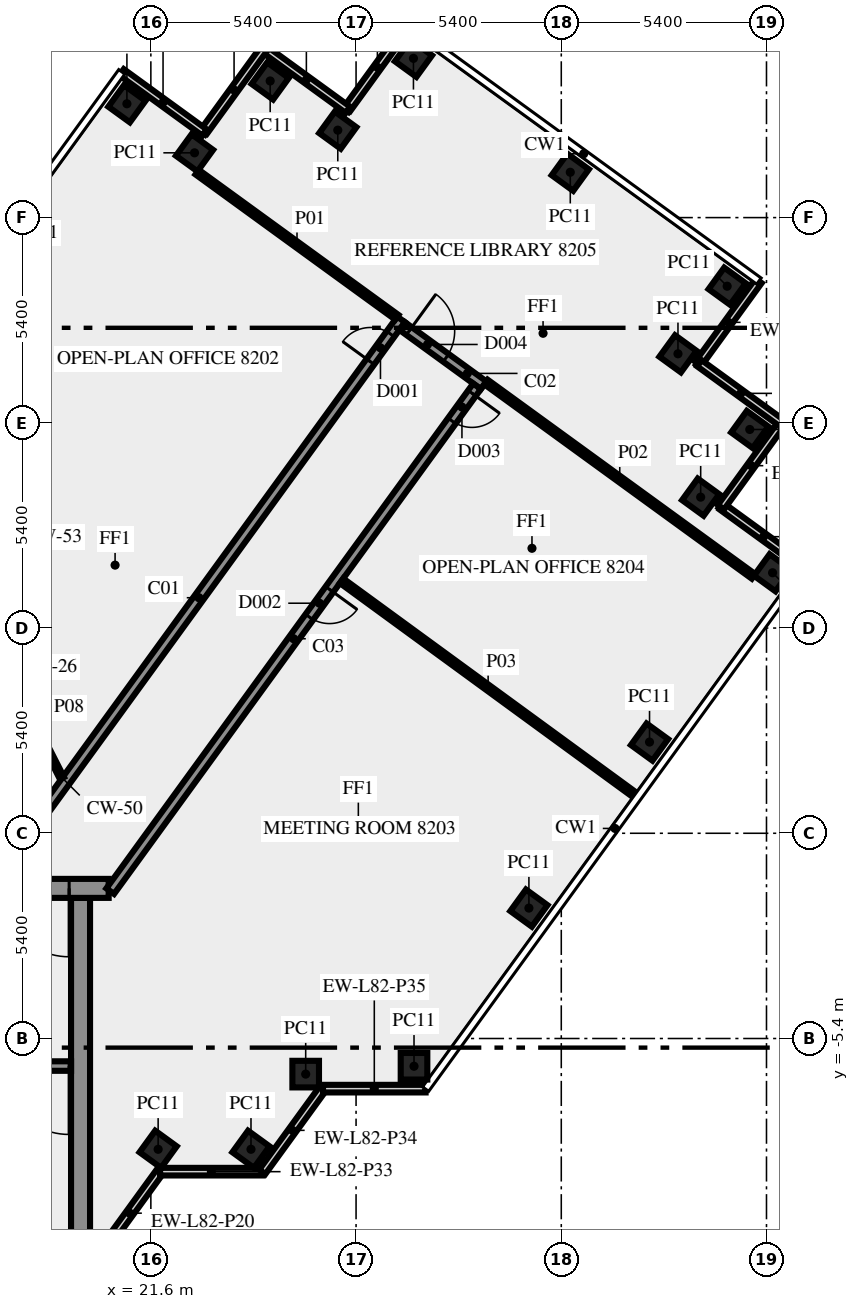
"""IFC4 building model, lengths in metres.
Left out: names, types, materials, properties, quantities, classifications, styles, units other than length and angle.
Written with IfcOpenShell. Run it as: python <this file> out.ifc"""

import sys

from ifc_helpers import new_model, si_unit, direction, frame, frame_2d, origin, origin_2d, place, context, subcontext, project, spatial, rectangle, extrude, element, fill, save


model = new_model("IFC4")
c1 = context("Model", 3, precision=1e-05, world=origin(), true_north=direction((0.0, 1.0)))
c2 = subcontext(c1, "Body", "Model", "MODEL_VIEW")
j1 = project(units=[si_unit("LENGTHUNIT", "METRE"), si_unit("PLANEANGLEUNIT", "RADIAN")], contexts=[c1])
p1 = place(None, origin())
s1 = spatial("IfcSite", under=j1, at=p1, CompositionType="ELEMENT")
p2 = place(p1, origin())
s2 = spatial("IfcBuilding", under=s1, at=p2, CompositionType="ELEMENT")
p3 = place(p2, frame((0.0, 0.0, 351.0)))
s3 = spatial("IfcBuildingStorey", under=s2, at=p3, CompositionType="ELEMENT", Elevation=351.0)
for number, where, z_axis, x_axis in (
    (1, (21.792, -8.315, 0.0), (0.0, 0.0, 1.0), (0.588, 0.809, 0.0)),
    (2, (24.235, -8.315, 0.0), (0.0, 0.0, 1.0), (0.588, 0.809, 0.0)),
    (3, (25.674, -6.337, 0.0), (0.0, 0.0, 1.0), (1.0, 0.0, 0.0)),
    (4, (28.525, -6.13, 0.0), (0.0, 0.0, 1.0), (1.0, 0.0, 0.0)),
    (5, (31.548, -1.969, 0.0), (0.0, 0.0, 1.0), (0.588, 0.809, 0.0)),
    (6, (34.722, 2.4, 0.0), (0.0, 0.0, 1.0), (0.588, 0.809, 0.0)),
    (7, (37.96, 6.855, 0.0), (0.0, 0.0, 1.0), (0.588, 0.809, 0.0)),
    (8, (36.068, 8.844, 0.0), (0.0, 0.0, 1.0), (0.588, 0.809, 0.0)),
    (9, (37.36, 10.625, 0.0), (0.0, 0.0, 1.0), (0.588, 0.809, 0.0)),
    (10, (35.471, 12.616, 0.0), (0.0, 0.0, 1.0), (-0.809, 0.588, 0.0)),
    (11, (36.765, 14.395, 0.0), (0.0, 0.0, 1.0), (-0.809, 0.588, 0.0)),
    (12, (32.637, 17.393, 0.0), (0.0, 0.0, 1.0), (-0.809, 0.588, 0.0)),
    (13, (28.51, 20.39, 0.0), (0.0, 0.0, 1.0), (-0.588, -0.809, 0.0)),
    (14, (26.519, 18.5, 0.0), (0.0, 0.0, 1.0), (-0.809, 0.588, 0.0)),
    (15, (24.74, 19.795, 0.0), (0.0, 0.0, 1.0), (-0.588, -0.809, 0.0)),
    (16, (22.749, 17.904, 0.0), (0.0, 0.0, 1.0), (-0.588, -0.809, 0.0)),
    (17, (20.97, 19.195, 0.0), (0.0, 0.0, 1.0), (-0.588, -0.809, 0.0)),
):
    element("IfcColumn", number, at=place(p3, frame(where, z_axis=z_axis, x_axis=x_axis)), inside=s3, PredefinedType="COLUMN", context=c2, shape_type="SweptSolid", body=[
        extrude(rectangle(XDim=0.7, YDim=0.7, at=origin_2d()), origin(), (0.0, 0.0, 1.0), 3.2),
    ])
p4 = place(p3, frame((20.253, -11.083, 0.0), z_axis=(0.0, 0.0, 1.0), x_axis=(0.587766567315, 0.809030569476, 0.0)))
e18 = element("IfcWall", 18, at=p4, inside=s3, PredefinedType="SOLIDWALL", context=c2, shape_type="SweptSolid", body=[
    extrude(rectangle(XDim=2.688, YDim=0.2, at=frame_2d((1.344, 0.0))), origin(), (0.0, 0.0, 1.0), 3.2),
])
p5 = place(p3, frame((36.005, 12.352, 0.0), z_axis=(0.0, 0.0, 1.0), x_axis=(0.587762999008, 0.809033161865, 0.0)))
e19 = element("IfcWall", 19, at=p5, inside=s3, PredefinedType="SOLIDWALL", context=c2, shape_type="SweptSolid", body=[
    extrude(rectangle(XDim=2.7, YDim=0.2, at=frame_2d((1.35, 0.0))), origin(), (0.0, 0.0, 1.0), 3.2),
])
for number, where, z_axis, x_axis in (
    (20, (28.354, 21.247, 0.0), (0.0, 0.0, 1.0), (-0.588, -0.809, 0.0)),
    (21, (26.785, 19.036, 0.0), (0.0, 0.0, 1.0), (-0.809, 0.588, 0.0)),
):
    element("IfcWall", number, at=place(p3, frame(where, z_axis=z_axis, x_axis=x_axis)), inside=s3, PredefinedType="SOLIDWALL", context=c2, shape_type="SweptSolid", body=[
        extrude(rectangle(XDim=2.7, YDim=0.2, at=frame_2d((1.35, 0.0))), origin(), (0.0, 0.0, 1.0), 3.2),
    ])
for number, where, z_axis, x_axis in (
    (22, (24.583, 20.65, 0.0), (0.0, 0.0, 1.0), (-0.588, -0.809, 0.0)),
    (23, (23.013, 18.438, 0.0), (0.0, 0.0, 1.0), (-0.809, 0.588, 0.0)),
    (24, (21.843, -8.904, 0.0), (0.0, 0.0, 1.0), (1.0, 0.0, 0.0)),
):
    element("IfcWall", number, at=place(p3, frame(where, z_axis=z_axis, x_axis=x_axis)), inside=s3, PredefinedType="SOLIDWALL", context=c2, shape_type="SweptSolid", body=[
        extrude(rectangle(XDim=2.7, YDim=0.2, at=frame_2d((1.35, 0.0))), origin(), (0.0, 0.0, 1.0), 3.2),
    ])
p6 = place(p3, frame((24.533, -8.909, 0.0), z_axis=(0.0, 0.0, 1.0), x_axis=(0.587720002413, 0.809064397168, 0.0)))
e25 = element("IfcWall", 25, at=p6, inside=s3, PredefinedType="SOLIDWALL", context=c2, shape_type="SweptSolid", body=[
    extrude(rectangle(XDim=2.7, YDim=0.2, at=frame_2d((1.35, 0.0))), origin(), (0.0, 0.0, 1.0), 3.2),
])
for number, where, z_axis, x_axis in (
    (26, (26.13, -6.719, 0.0), (0.0, 0.0, 1.0), (1.0, 0.0, 0.0)),
    (27, (38.814, 7.01, 0.0), (0.0, 0.0, 1.0), (-0.809, 0.588, 0.0)),
    (28, (36.602, 8.58, 0.0), (0.0, 0.0, 1.0), (0.588, 0.809, 0.0)),
    (29, (38.216, 10.782, 0.0), (0.0, 0.0, 1.0), (-0.809, 0.588, 0.0)),
):
    element("IfcWall", number, at=place(p3, frame(where, z_axis=z_axis, x_axis=x_axis)), inside=s3, PredefinedType="SOLIDWALL", context=c2, shape_type="SweptSolid", body=[
        extrude(rectangle(XDim=2.7, YDim=0.2, at=frame_2d((1.35, 0.0))), origin(), (0.0, 0.0, 1.0), 3.2),
    ])
p7 = place(p3, frame((19.75, -10.5, 0.0), z_axis=(0.0, 0.0, 1.0), x_axis=(0.0, 1.0, 0.0)))
e30 = element("IfcWall", 30, at=p7, inside=s3, PredefinedType="SHEAR", context=c2, shape_type="SweptSolid", body=[
    extrude(rectangle(XDim=8.8, YDim=0.5, at=frame_2d((4.4, 0.0))), origin(), (0.0, 0.0, 1.0), 3.2),
])
p8 = place(p3, frame((19.5, -6.125, 0.0), z_axis=(0.0, 0.0, 1.0), x_axis=(-1.0, 0.0, 0.0)))
e31 = element("IfcWall", 31, at=p8, inside=s3, PredefinedType="SHEAR", context=c2, shape_type="SweptSolid", body=[
    extrude(rectangle(XDim=8.05, YDim=0.25, at=frame_2d((4.025, 0.0))), origin(), (0.0, 0.0, 1.0), 3.2),
])
p9 = place(p8, frame((0.05, 0.0, 0.0)))
e32 = element("IfcOpeningElement", 32, at=p9, cuts=e31, PredefinedType="OPENING", context=c2, shape_type="SweptSolid", body=[
    extrude(rectangle(XDim=1.8, YDim=2.1, at=frame_2d((0.9, 1.05))), frame((0.0, 0.135, 0.0), z_axis=(0.0, -1.0, 0.0), x_axis=(1.0, 0.0, 0.0)), (0.0, 0.0, 1.0), 0.27),
])
p10 = place(p3, frame((20.49, -1.45, 0.0), z_axis=(0.0, 0.0, 1.0), x_axis=(-1.0, 0.0, 0.0)))
e33 = element("IfcWall", 33, at=p10, inside=s3, PredefinedType="SHEAR", context=c2, shape_type="SweptSolid", body=[
    extrude(rectangle(XDim=40.98, YDim=0.5, at=frame_2d((20.49, 0.0))), origin(), (0.0, 0.0, 1.0), 3.2),
])
p11 = place(p10, frame((38.14, 0.0, 0.0)))
e34 = element("IfcOpeningElement", 34, at=p11, cuts=e33, PredefinedType="OPENING", context=c2, shape_type="SweptSolid", body=[
    extrude(rectangle(XDim=1.8, YDim=2.1, at=frame_2d((0.9, 1.05))), frame((0.0, 0.26, 0.0), z_axis=(0.0, -1.0, 0.0), x_axis=(1.0, 0.0, 0.0)), (0.0, 0.0, 1.0), 0.52),
])
p12 = place(p10, frame((36.728, 0.0, 0.0)))
e35 = element("IfcOpeningElement", 35, at=p12, cuts=e33, PredefinedType="OPENING", context=c2, shape_type="SweptSolid", body=[
    extrude(rectangle(XDim=0.8, YDim=2.1, at=frame_2d((0.4, 1.05))), frame((0.0, 0.26, 0.0), z_axis=(0.0, -1.0, 0.0), x_axis=(1.0, 0.0, 0.0)), (0.0, 0.0, 1.0), 0.52),
])
p13 = place(p10, frame((35.153, 0.0, 0.0)))
e36 = element("IfcOpeningElement", 36, at=p13, cuts=e33, PredefinedType="OPENING", context=c2, shape_type="SweptSolid", body=[
    extrude(rectangle(XDim=0.8, YDim=2.1, at=frame_2d((0.4, 1.05))), frame((0.0, 0.26, 0.0), z_axis=(0.0, -1.0, 0.0), x_axis=(1.0, 0.0, 0.0)), (0.0, 0.0, 1.0), 0.52),
])
p14 = place(p10, frame((32.94, 0.0, 0.0)))
e37 = element("IfcOpeningElement", 37, at=p14, cuts=e33, PredefinedType="OPENING", context=c2, shape_type="SweptSolid", body=[
    extrude(rectangle(XDim=0.9, YDim=2.1, at=frame_2d((0.45, 1.05))), frame((0.0, 0.26, 0.0), z_axis=(0.0, -1.0, 0.0), x_axis=(1.0, 0.0, 0.0)), (0.0, 0.0, 1.0), 0.52),
])
p15 = place(p10, frame((31.015, 0.0, 0.0)))
e38 = element("IfcOpeningElement", 38, at=p15, cuts=e33, PredefinedType="OPENING", context=c2, shape_type="SweptSolid", body=[
    extrude(rectangle(XDim=0.8, YDim=2.1, at=frame_2d((0.4, 1.05))), frame((0.0, 0.26, 0.0), z_axis=(0.0, -1.0, 0.0), x_axis=(1.0, 0.0, 0.0)), (0.0, 0.0, 1.0), 0.52),
])
p16 = place(p10, frame((24.765, 0.0, 0.0)))
e39 = element("IfcOpeningElement", 39, at=p16, cuts=e33, PredefinedType="OPENING", context=c2, shape_type="SweptSolid", body=[
    extrude(rectangle(XDim=0.8, YDim=2.1, at=frame_2d((0.4, 1.05))), frame((0.0, 0.26, 0.0), z_axis=(0.0, -1.0, 0.0), x_axis=(1.0, 0.0, 0.0)), (0.0, 0.0, 1.0), 0.52),
])
p17 = place(p10, frame((21.765, 0.0, 0.0)))
e40 = element("IfcOpeningElement", 40, at=p17, cuts=e33, PredefinedType="OPENING", context=c2, shape_type="SweptSolid", body=[
    extrude(rectangle(XDim=2.0, YDim=2.1, at=frame_2d((1.0, 1.05))), frame((0.0, 0.26, 0.0), z_axis=(0.0, -1.0, 0.0), x_axis=(1.0, 0.0, 0.0)), (0.0, 0.0, 1.0), 0.52),
])
p18 = place(p10, frame((14.002, 0.0, 0.0)))
e41 = element("IfcOpeningElement", 41, at=p18, cuts=e33, PredefinedType="OPENING", context=c2, shape_type="SweptSolid", body=[
    extrude(rectangle(XDim=0.9, YDim=2.1, at=frame_2d((0.45, 1.05))), frame((0.0, 0.26, 0.0), z_axis=(0.0, -1.0, 0.0), x_axis=(1.0, 0.0, 0.0)), (0.0, 0.0, 1.0), 0.52),
])
p19 = place(p10, frame((10.278, 0.0, 0.0)))
e42 = element("IfcOpeningElement", 42, at=p19, cuts=e33, PredefinedType="OPENING", context=c2, shape_type="SweptSolid", body=[
    extrude(rectangle(XDim=0.9, YDim=2.1, at=frame_2d((0.45, 1.05))), frame((0.0, 0.26, 0.0), z_axis=(0.0, -1.0, 0.0), x_axis=(1.0, 0.0, 0.0)), (0.0, 0.0, 1.0), 0.52),
])
p20 = place(p10, frame((7.14, 0.0, 0.0)))
e43 = element("IfcOpeningElement", 43, at=p20, cuts=e33, PredefinedType="OPENING", context=c2, shape_type="SweptSolid", body=[
    extrude(rectangle(XDim=0.9, YDim=2.1, at=frame_2d((0.45, 1.05))), frame((0.0, 0.26, 0.0), z_axis=(0.0, -1.0, 0.0), x_axis=(1.0, 0.0, 0.0)), (0.0, 0.0, 1.0), 0.52),
])
p21 = place(p10, frame((4.19, 0.0, 0.0)))
e44 = element("IfcOpeningElement", 44, at=p21, cuts=e33, PredefinedType="OPENING", context=c2, shape_type="SweptSolid", body=[
    extrude(rectangle(XDim=0.9, YDim=2.1, at=frame_2d((0.45, 1.05))), frame((0.0, 0.26, 0.0), z_axis=(0.0, -1.0, 0.0), x_axis=(1.0, 0.0, 0.0)), (0.0, 0.0, 1.0), 0.52),
])
p22 = place(p10, frame((1.04, 0.0, 0.0)))
e45 = element("IfcOpeningElement", 45, at=p22, cuts=e33, PredefinedType="OPENING", context=c2, shape_type="SweptSolid", body=[
    extrude(rectangle(XDim=1.8, YDim=2.1, at=frame_2d((0.9, 1.05))), frame((0.0, 0.26, 0.0), z_axis=(0.0, -1.0, 0.0), x_axis=(1.0, 0.0, 0.0)), (0.0, 0.0, 1.0), 0.52),
])
p23 = place(p3, frame((17.545, -1.125, 0.0), z_axis=(0.0, 0.0, 1.0), x_axis=(0.58779555165, 0.809009511354, 0.0)))
e46 = element("IfcWall", 46, at=p23, inside=s3, PredefinedType="SOLIDWALL", context=c2, shape_type="SweptSolid", body=[
    extrude(rectangle(XDim=18.103, YDim=0.25, at=frame_2d((9.052, 0.0))), origin(), (0.0, 0.0, 1.0), 3.2),
])
p24 = place(p23, frame((16.728, 0.0, 0.0)))
e47 = element("IfcOpeningElement", 47, at=p24, cuts=e46, PredefinedType="OPENING", context=c2, shape_type="SweptSolid", body=[
    extrude(rectangle(XDim=0.9, YDim=2.1, at=frame_2d((0.45, 1.05))), frame((0.0, 0.135, 0.0), z_axis=(0.0, -1.0, 0.0), x_axis=(1.0, 0.0, 0.0)), (0.0, 0.0, 1.0), 0.27),
])
p25 = place(p3, frame((28.213, 13.346, 0.0), z_axis=(0.0, 0.0, 1.0), x_axis=(0.809006914995, -0.587799125119, 0.0)))
e48 = element("IfcWall", 48, at=p25, inside=s3, PredefinedType="SOLIDWALL", context=c2, shape_type="SweptSolid", body=[
    extrude(rectangle(XDim=2.65, YDim=0.25, at=frame_2d((1.325, 0.0))), origin(), (0.0, 0.0, 1.0), 3.2),
])
p26 = place(p25, frame((0.225, 0.0, 0.0)))
e49 = element("IfcOpeningElement", 49, at=p26, cuts=e48, PredefinedType="OPENING", context=c2, shape_type="SweptSolid", body=[
    extrude(rectangle(XDim=1.2, YDim=2.1, at=frame_2d((0.6, 1.05))), frame((0.0, 0.135, 0.0), z_axis=(0.0, -1.0, 0.0), x_axis=(1.0, 0.0, 0.0)), (0.0, 0.0, 1.0), 0.27),
])
p27 = place(p3, frame((30.183, 11.761, 0.0), z_axis=(0.0, 0.0, 1.0), x_axis=(-0.587781762867, -0.80901952958, 0.0)))
e50 = element("IfcWall", 50, at=p27, inside=s3, PredefinedType="SOLIDWALL", context=c2, shape_type="SweptSolid", body=[
    extrude(rectangle(XDim=16.42, YDim=0.25, at=frame_2d((8.21, 0.0))), origin(), (0.0, 0.0, 1.0), 3.2),
])
p28 = place(p27, frame((0.225, 0.0, 0.0)))
e51 = element("IfcOpeningElement", 51, at=p28, cuts=e50, PredefinedType="OPENING", context=c2, shape_type="SweptSolid", body=[
    extrude(rectangle(XDim=0.9, YDim=2.1, at=frame_2d((0.45, 1.05))), frame((0.0, 0.135, 0.0), z_axis=(0.0, -1.0, 0.0), x_axis=(1.0, 0.0, 0.0)), (0.0, 0.0, 1.0), 0.27),
])
p29 = place(p27, frame((6.605, 0.0, 0.0)))
e52 = element("IfcOpeningElement", 52, at=p29, cuts=e50, PredefinedType="OPENING", context=c2, shape_type="SweptSolid", body=[
    extrude(rectangle(XDim=0.9, YDim=2.1, at=frame_2d((0.45, 1.05))), frame((0.0, 0.135, 0.0), z_axis=(0.0, -1.0, 0.0), x_axis=(1.0, 0.0, 0.0)), (0.0, 0.0, 1.0), 0.27),
])
p30 = place(p3, frame((28.073, 13.578, 0.0), z_axis=(0.0, 0.0, 1.0), x_axis=(-0.809000932727, 0.587807358619, 0.0)))
e53 = element("IfcWall", 53, at=p30, inside=s3, PredefinedType="PARTITIONING", context=c2, shape_type="SweptSolid", body=[
    extrude(rectangle(XDim=6.496, YDim=0.15, at=frame_2d((3.248, 0.0))), origin(), (0.0, 0.0, 1.0), 3.2),
])
p31 = place(p3, frame((37.458, 6.76, 0.0), z_axis=(0.0, 0.0, 1.0), x_axis=(-0.809016295501, 0.587786214209, 0.0)))
e54 = element("IfcWall", 54, at=p31, inside=s3, PredefinedType="PARTITIONING", context=c2, shape_type="SweptSolid", body=[
    extrude(rectangle(XDim=8.7, YDim=0.15, at=frame_2d((4.35, 0.0))), origin(), (0.0, 0.0, 1.0), 3.2),
])
p32 = place(p3, frame((26.619, 6.643, 0.0), z_axis=(0.0, 0.0, 1.0), x_axis=(0.807594822539, -0.589737740532, 0.0)))
e55 = element("IfcWall", 55, at=p32, inside=s3, PredefinedType="PARTITIONING", context=c2, shape_type="SweptSolid", body=[
    extrude(rectangle(XDim=9.55, YDim=0.15, at=frame_2d((4.775, 0.0))), origin(), (0.0, 0.0, 1.0), 2.5),
])
p33 = place(p3, frame((18.0, 3.925, 0.0), z_axis=(0.0, 0.0, 1.0), x_axis=(0.453950796792, -0.891026752736, 0.0)))
e56 = element("IfcWall", 56, at=p33, inside=s3, PredefinedType="PARTITIONING", context=c2, shape_type="SweptSolid", body=[
    extrude(rectangle(XDim=2.778, YDim=0.12, at=frame_2d((1.389, 0.0))), origin(), (0.0, 0.0, 1.0), 3.2),
])
p34 = place(p9, origin())
e57 = element("IfcDoor", 57, at=p34, inside=s3, OperationType="DOUBLE_DOOR_SINGLE_SWING", PredefinedType="DOOR", context=c2, shape_type="SweptSolid", body=[
    extrude(rectangle(XDim=1.8, YDim=2.1, at=frame_2d((0.9, 1.05))), frame((0.0, 0.025, 0.0), z_axis=(0.0, -1.0, 0.0), x_axis=(1.0, 0.0, 0.0)), (0.0, 0.0, 1.0), 0.05),
])
fill(e32, e57)
p35 = place(p22, origin())
e58 = element("IfcDoor", 58, at=p35, inside=s3, OperationType="DOUBLE_DOOR_SINGLE_SWING", PredefinedType="DOOR", context=c2, shape_type="SweptSolid", body=[
    extrude(rectangle(XDim=1.8, YDim=2.1, at=frame_2d((0.9, 1.05))), frame((0.0, 0.025, 0.0), z_axis=(0.0, -1.0, 0.0), x_axis=(1.0, 0.0, 0.0)), (0.0, 0.0, 1.0), 0.05),
])
fill(e45, e58)
p36 = place(p24, origin())
e59 = element("IfcDoor", 59, at=p36, inside=s3, OperationType="SINGLE_SWING_RIGHT", PredefinedType="DOOR", context=c2, shape_type="SweptSolid", body=[
    extrude(rectangle(XDim=0.9, YDim=2.1, at=frame_2d((0.45, 1.05))), frame((0.0, 0.025, 0.0), z_axis=(0.0, -1.0, 0.0), x_axis=(1.0, 0.0, 0.0)), (0.0, 0.0, 1.0), 0.05),
])
fill(e47, e59)
p37 = place(p28, origin())
e60 = element("IfcDoor", 60, at=p37, inside=s3, OperationType="SINGLE_SWING_LEFT", PredefinedType="DOOR", context=c2, shape_type="SweptSolid", body=[
    extrude(rectangle(XDim=0.9, YDim=2.1, at=frame_2d((0.45, 1.05))), frame((0.0, 0.025, 0.0), z_axis=(0.0, -1.0, 0.0), x_axis=(1.0, 0.0, 0.0)), (0.0, 0.0, 1.0), 0.05),
])
fill(e51, e60)
p38 = place(p26, origin())
e61 = element("IfcDoor", 61, at=p38, inside=s3, OperationType="SINGLE_SWING_LEFT", PredefinedType="DOOR", context=c2, shape_type="SweptSolid", body=[
    extrude(rectangle(XDim=1.2, YDim=2.1, at=frame_2d((0.6, 1.05))), frame((0.0, 0.025, 0.0), z_axis=(0.0, -1.0, 0.0), x_axis=(1.0, 0.0, 0.0)), (0.0, 0.0, 1.0), 0.05),
])
fill(e49, e61)
p39 = place(p29, origin())
e62 = element("IfcDoor", 62, at=p39, inside=s3, OperationType="SINGLE_SWING_LEFT", PredefinedType="DOOR", context=c2, shape_type="SweptSolid", body=[
    extrude(rectangle(XDim=0.9, YDim=2.1, at=frame_2d((0.45, 1.05))), frame((0.0, 0.025, 0.0), z_axis=(0.0, -1.0, 0.0), x_axis=(1.0, 0.0, 0.0)), (0.0, 0.0, 1.0), 0.05),
])
fill(e52, e62)
save(model, sys.argv[1])
